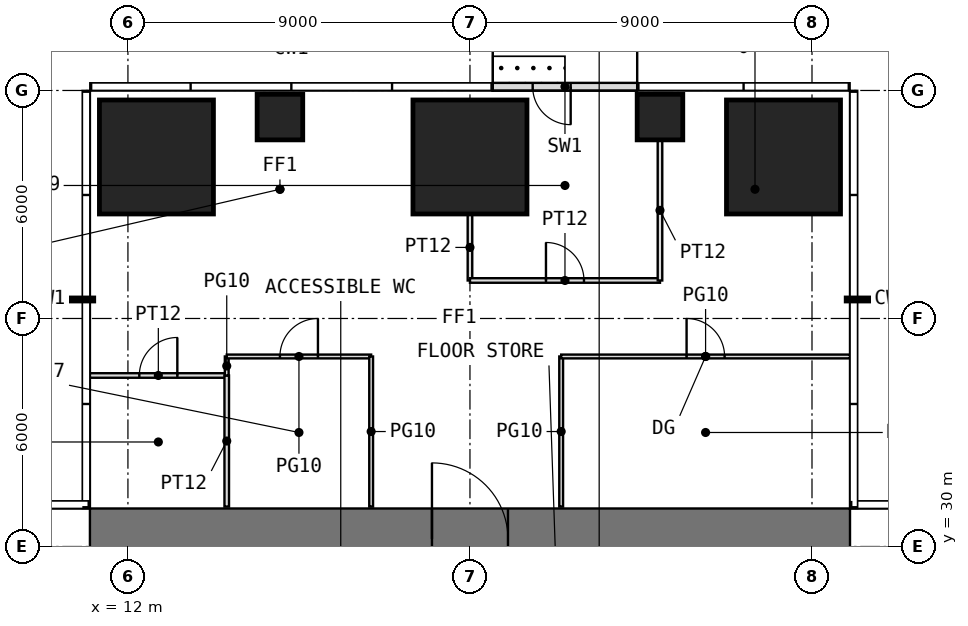
"""IFC4 building model, lengths in metres.
Left out: names, types, materials, properties, quantities, classifications, styles, units other than length and angle.
Written with IfcOpenShell. Run it as: python <this file> out.ifc"""

import sys

from ifc_helpers import new_model, si_unit, direction, frame, frame_2d, origin, origin_2d, place, context, subcontext, project, spatial, rectangle, extrude, element, fill, save


model = new_model("IFC4")
c1 = context("Model", 3, precision=1e-05, world=origin(), true_north=direction((0.0, 1.0)))
c2 = subcontext(c1, "Body", "Model", "MODEL_VIEW")
j1 = project(units=[si_unit("LENGTHUNIT", "METRE"), si_unit("PLANEANGLEUNIT", "RADIAN")], contexts=[c1])
p1 = place(None, origin())
s1 = spatial("IfcSite", under=j1, at=p1, CompositionType="ELEMENT")
p2 = place(p1, origin())
s2 = spatial("IfcBuilding", under=s1, at=p2, CompositionType="ELEMENT")
p3 = place(p2, frame((0.0, 0.0, 120.5)))
s3 = spatial("IfcBuildingStorey", under=s2, at=p3, CompositionType="ELEMENT", Elevation=120.5)
p4 = place(p3, frame((12.75, 40.25, 0.0), z_axis=(0.0, 0.0, 1.0), x_axis=(1.0, 0.0, 0.0)))
e1 = element("IfcColumn", 1, at=p4, inside=s3, PredefinedType="COLUMN", context=c2, shape_type="SweptSolid", body=[
    extrude(rectangle(XDim=3.0, YDim=3.0, at=origin_2d()), origin(), (0.0, 0.0, 1.0), 4.0),
])
p5 = place(p3, frame((16.0, 41.3, 0.0), z_axis=(0.0, 0.0, 1.0), x_axis=(1.0, 0.0, 0.0)))
e2 = element("IfcColumn", 2, at=p5, inside=s3, PredefinedType="COLUMN", context=c2, shape_type="SweptSolid", body=[
    extrude(rectangle(XDim=1.2, YDim=1.2, at=origin_2d()), origin(), (0.0, 0.0, 1.0), 4.0),
])
p6 = place(p3, frame((21.0, 40.25, 0.0), z_axis=(0.0, 0.0, 1.0), x_axis=(1.0, 0.0, 0.0)))
e3 = element("IfcColumn", 3, at=p6, inside=s3, PredefinedType="COLUMN", context=c2, shape_type="SweptSolid", body=[
    extrude(rectangle(XDim=3.0, YDim=3.0, at=origin_2d()), origin(), (0.0, 0.0, 1.0), 4.0),
])
p7 = place(p3, frame((26.0, 41.3, 0.0), z_axis=(0.0, 0.0, 1.0), x_axis=(1.0, 0.0, 0.0)))
e4 = element("IfcColumn", 4, at=p7, inside=s3, PredefinedType="COLUMN", context=c2, shape_type="SweptSolid", body=[
    extrude(rectangle(XDim=1.2, YDim=1.2, at=origin_2d()), origin(), (0.0, 0.0, 1.0), 4.0),
])
p8 = place(p3, frame((29.25, 40.25, 0.0), z_axis=(0.0, 0.0, 1.0), x_axis=(1.0, 0.0, 0.0)))
e5 = element("IfcColumn", 5, at=p8, inside=s3, PredefinedType="COLUMN", context=c2, shape_type="SweptSolid", body=[
    extrude(rectangle(XDim=3.0, YDim=3.0, at=origin_2d()), origin(), (0.0, 0.0, 1.0), 4.0),
])
p9 = place(p3, frame((25.4, 42.1, 0.0), z_axis=(0.0, 0.0, 1.0), x_axis=(-1.0, 0.0, 0.0)))
e6 = element("IfcWall", 6, at=p9, inside=s3, PredefinedType="USERDEFINED", context=c2, shape_type="SweptSolid", body=[
    extrude(rectangle(XDim=3.8, YDim=0.2, at=frame_2d((1.9, 0.0))), origin(), (0.0, 0.0, 1.0), 3.75),
])
p10 = place(p9, frame((1.75, 0.0, 0.0)))
e7 = element("IfcOpeningElement", 7, at=p10, cuts=e6, PredefinedType="OPENING", context=c2, shape_type="SweptSolid", body=[
    extrude(rectangle(XDim=1.0, YDim=2.4, at=frame_2d((0.5, 1.2))), frame((0.0, 0.11, 0.0), z_axis=(0.0, -1.0, 0.0), x_axis=(1.0, 0.0, 0.0)), (0.0, 0.0, 1.0), 0.22),
])
p11 = place(p3, frame((11.0, 30.2, -0.05), z_axis=(0.0, 0.0, 1.0), x_axis=(1.0, 0.0, 0.0)))
e8 = element("IfcWall", 8, at=p11, inside=s3, PredefinedType="SHEAR", context=c2, shape_type="SweptSolid", body=[
    extrude(rectangle(XDim=20.0, YDim=1.6, at=frame_2d((10.0, 0.0))), origin(), (0.0, 0.0, 1.0), 4.0),
])
p12 = place(p11, frame((9.0, 0.0, 0.05)))
e9 = element("IfcOpeningElement", 9, at=p12, cuts=e8, PredefinedType="OPENING", context=c2, shape_type="SweptSolid", body=[
    extrude(rectangle(XDim=2.0, YDim=2.2, at=frame_2d((1.0, 1.1))), frame((0.0, 0.81, 0.0), z_axis=(0.0, -1.0, 0.0), x_axis=(1.0, 0.0, 0.0)), (0.0, 0.0, 1.0), 1.62),
])
p13 = place(p3, frame((11.0, 34.5, 0.0), z_axis=(0.0, 0.0, 1.0), x_axis=(1.0, 0.0, 0.0)))
e10 = element("IfcWall", 10, at=p13, inside=s3, PredefinedType="PARTITIONING", context=c2, shape_type="SweptSolid", body=[
    extrude(rectangle(XDim=3.6, YDim=0.12, at=frame_2d((1.8, 0.0))), origin(), (0.0, 0.0, 1.0), 3.75),
])
p14 = place(p13, frame((1.3, 0.0, 0.0)))
e11 = element("IfcOpeningElement", 11, at=p14, cuts=e10, PredefinedType="OPENING", context=c2, shape_type="SweptSolid", body=[
    extrude(rectangle(XDim=1.0, YDim=2.2, at=frame_2d((0.5, 1.1))), frame((0.0, 0.07, 0.0), z_axis=(0.0, -1.0, 0.0), x_axis=(1.0, 0.0, 0.0)), (0.0, 0.0, 1.0), 0.14),
])
p15 = place(p3, frame((14.6, 31.05, 0.0), z_axis=(0.0, 0.0, 1.0), x_axis=(0.0, 1.0, 0.0)))
e12 = element("IfcWall", 12, at=p15, inside=s3, PredefinedType="PARTITIONING", context=c2, shape_type="SweptSolid", body=[
    extrude(rectangle(XDim=3.45, YDim=0.12, at=frame_2d((1.725, 0.0))), origin(), (0.0, 0.0, 1.0), 3.75),
])
p16 = place(p3, frame((14.6, 34.5, 0.0), z_axis=(0.0, 0.0, 1.0), x_axis=(0.0, 1.0, 0.0)))
e13 = element("IfcWall", 13, at=p16, inside=s3, PredefinedType="PARTITIONING", context=c2, shape_type="SweptSolid", body=[
    extrude(rectangle(XDim=0.5, YDim=0.1, at=frame_2d((0.25, 0.0))), origin(), (0.0, 0.0, 1.0), 3.75),
])
p17 = place(p3, frame((14.6, 35.0, 0.0), z_axis=(0.0, 0.0, 1.0), x_axis=(1.0, 0.0, 0.0)))
e14 = element("IfcWall", 14, at=p17, inside=s3, PredefinedType="PARTITIONING", context=c2, shape_type="SweptSolid", body=[
    extrude(rectangle(XDim=3.8, YDim=0.1, at=frame_2d((1.9, 0.0))), origin(), (0.0, 0.0, 1.0), 3.75),
])
p18 = place(p17, frame((1.4, 0.0, 0.0)))
e15 = element("IfcOpeningElement", 15, at=p18, cuts=e14, PredefinedType="OPENING", context=c2, shape_type="SweptSolid", body=[
    extrude(rectangle(XDim=1.0, YDim=2.4, at=frame_2d((0.5, 1.2))), frame((0.0, 0.06, 0.0), z_axis=(0.0, -1.0, 0.0), x_axis=(1.0, 0.0, 0.0)), (0.0, 0.0, 1.0), 0.12),
])
p19 = place(p3, frame((18.4, 31.05, 0.0), z_axis=(0.0, 0.0, 1.0), x_axis=(0.0, 1.0, 0.0)))
e16 = element("IfcWall", 16, at=p19, inside=s3, PredefinedType="PARTITIONING", context=c2, shape_type="SweptSolid", body=[
    extrude(rectangle(XDim=3.95, YDim=0.1, at=frame_2d((1.975, 0.0))), origin(), (0.0, 0.0, 1.0), 3.75),
])
p20 = place(p3, frame((21.0, 37.0, 0.0), z_axis=(0.0, 0.0, 1.0), x_axis=(0.0, 1.0, 0.0)))
e17 = element("IfcWall", 17, at=p20, inside=s3, PredefinedType="PARTITIONING", context=c2, shape_type="SweptSolid", body=[
    extrude(rectangle(XDim=1.74, YDim=0.12, at=frame_2d((0.87, 0.0))), origin(), (0.0, 0.0, 1.0), 3.75),
])
p21 = place(p3, frame((21.0, 37.0, 0.0), z_axis=(0.0, 0.0, 1.0), x_axis=(1.0, 0.0, 0.0)))
e18 = element("IfcWall", 18, at=p21, inside=s3, PredefinedType="PARTITIONING", context=c2, shape_type="SweptSolid", body=[
    extrude(rectangle(XDim=5.0, YDim=0.12, at=frame_2d((2.5, 0.0))), origin(), (0.0, 0.0, 1.0), 3.75),
])
p22 = place(p21, frame((2.0, 0.0, 0.0)))
e19 = element("IfcOpeningElement", 19, at=p22, cuts=e18, PredefinedType="OPENING", context=c2, shape_type="SweptSolid", body=[
    extrude(rectangle(XDim=1.0, YDim=2.2, at=frame_2d((0.5, 1.1))), frame((0.0, 0.07, 0.0), z_axis=(0.0, -1.0, 0.0), x_axis=(1.0, 0.0, 0.0)), (0.0, 0.0, 1.0), 0.14),
])
p23 = place(p3, frame((23.4, 31.05, 0.0), z_axis=(0.0, 0.0, 1.0), x_axis=(0.0, 1.0, 0.0)))
e20 = element("IfcWall", 20, at=p23, inside=s3, PredefinedType="PARTITIONING", context=c2, shape_type="SweptSolid", body=[
    extrude(rectangle(XDim=3.95, YDim=0.1, at=frame_2d((1.975, 0.0))), origin(), (0.0, 0.0, 1.0), 3.75),
])
p24 = place(p3, frame((23.4, 35.0, 0.0), z_axis=(0.0, 0.0, 1.0), x_axis=(1.0, 0.0, 0.0)))
e21 = element("IfcWall", 21, at=p24, inside=s3, PredefinedType="PARTITIONING", context=c2, shape_type="SweptSolid", body=[
    extrude(rectangle(XDim=7.6, YDim=0.1, at=frame_2d((3.8, 0.0))), origin(), (0.0, 0.0, 1.0), 3.75),
])
p25 = place(p24, frame((3.3, 0.0, 0.0)))
e22 = element("IfcOpeningElement", 22, at=p25, cuts=e21, PredefinedType="OPENING", context=c2, shape_type="SweptSolid", body=[
    extrude(rectangle(XDim=1.0, YDim=2.4, at=frame_2d((0.5, 1.2))), frame((0.0, 0.06, 0.0), z_axis=(0.0, -1.0, 0.0), x_axis=(1.0, 0.0, 0.0)), (0.0, 0.0, 1.0), 0.12),
])
p26 = place(p3, frame((26.0, 37.0, 0.0), z_axis=(0.0, 0.0, 1.0), x_axis=(0.0, 1.0, 0.0)))
e23 = element("IfcWall", 23, at=p26, inside=s3, PredefinedType="PARTITIONING", context=c2, shape_type="SweptSolid", body=[
    extrude(rectangle(XDim=3.69, YDim=0.12, at=frame_2d((1.845, 0.0))), origin(), (0.0, 0.0, 1.0), 3.75),
])
p27 = place(p10, origin())
e24 = element("IfcDoor", 24, at=p27, inside=s3, OperationType="SINGLE_SWING_LEFT", PredefinedType="DOOR", context=c2, shape_type="SweptSolid", body=[
    extrude(rectangle(XDim=1.0, YDim=2.4, at=frame_2d((0.5, 1.2))), frame((0.0, 0.025, 0.0), z_axis=(0.0, -1.0, 0.0), x_axis=(1.0, 0.0, 0.0)), (0.0, 0.0, 1.0), 0.05),
])
fill(e7, e24)
p28 = place(p12, origin())
e25 = element("IfcDoor", 25, at=p28, inside=s3, OperationType="DOUBLE_DOOR_SINGLE_SWING", PredefinedType="DOOR", context=c2, shape_type="SweptSolid", body=[
    extrude(rectangle(XDim=2.0, YDim=2.2, at=frame_2d((1.0, 1.1))), frame((0.0, 0.025, 0.0), z_axis=(0.0, -1.0, 0.0), x_axis=(1.0, 0.0, 0.0)), (0.0, 0.0, 1.0), 0.05),
])
fill(e9, e25)
p29 = place(p14, origin())
e26 = element("IfcDoor", 26, at=p29, inside=s3, OperationType="SINGLE_SWING_RIGHT", PredefinedType="DOOR", context=c2, shape_type="SweptSolid", body=[
    extrude(rectangle(XDim=1.0, YDim=2.2, at=frame_2d((0.5, 1.1))), frame((0.0, 0.025, 0.0), z_axis=(0.0, -1.0, 0.0), x_axis=(1.0, 0.0, 0.0)), (0.0, 0.0, 1.0), 0.05),
])
fill(e11, e26)
p30 = place(p18, origin())
e27 = element("IfcDoor", 27, at=p30, inside=s3, OperationType="SINGLE_SWING_RIGHT", PredefinedType="DOOR", context=c2, shape_type="SweptSolid", body=[
    extrude(rectangle(XDim=1.0, YDim=2.4, at=frame_2d((0.5, 1.2))), frame((0.0, 0.025, 0.0), z_axis=(0.0, -1.0, 0.0), x_axis=(1.0, 0.0, 0.0)), (0.0, 0.0, 1.0), 0.05),
])
fill(e15, e27)
p31 = place(p25, origin())
e28 = element("IfcDoor", 28, at=p31, inside=s3, OperationType="SINGLE_SWING_LEFT", PredefinedType="DOOR", context=c2, shape_type="SweptSolid", body=[
    extrude(rectangle(XDim=1.0, YDim=2.4, at=frame_2d((0.5, 1.2))), frame((0.0, 0.025, 0.0), z_axis=(0.0, -1.0, 0.0), x_axis=(1.0, 0.0, 0.0)), (0.0, 0.0, 1.0), 0.05),
])
fill(e22, e28)
p32 = place(p22, origin())
e29 = element("IfcDoor", 29, at=p32, inside=s3, OperationType="SINGLE_SWING_LEFT", PredefinedType="DOOR", context=c2, shape_type="SweptSolid", body=[
    extrude(rectangle(XDim=1.0, YDim=2.2, at=frame_2d((0.5, 1.1))), frame((0.0, 0.025, 0.0), z_axis=(0.0, -1.0, 0.0), x_axis=(1.0, 0.0, 0.0)), (0.0, 0.0, 1.0), 0.05),
])
fill(e19, e29)
save(model, sys.argv[1])
